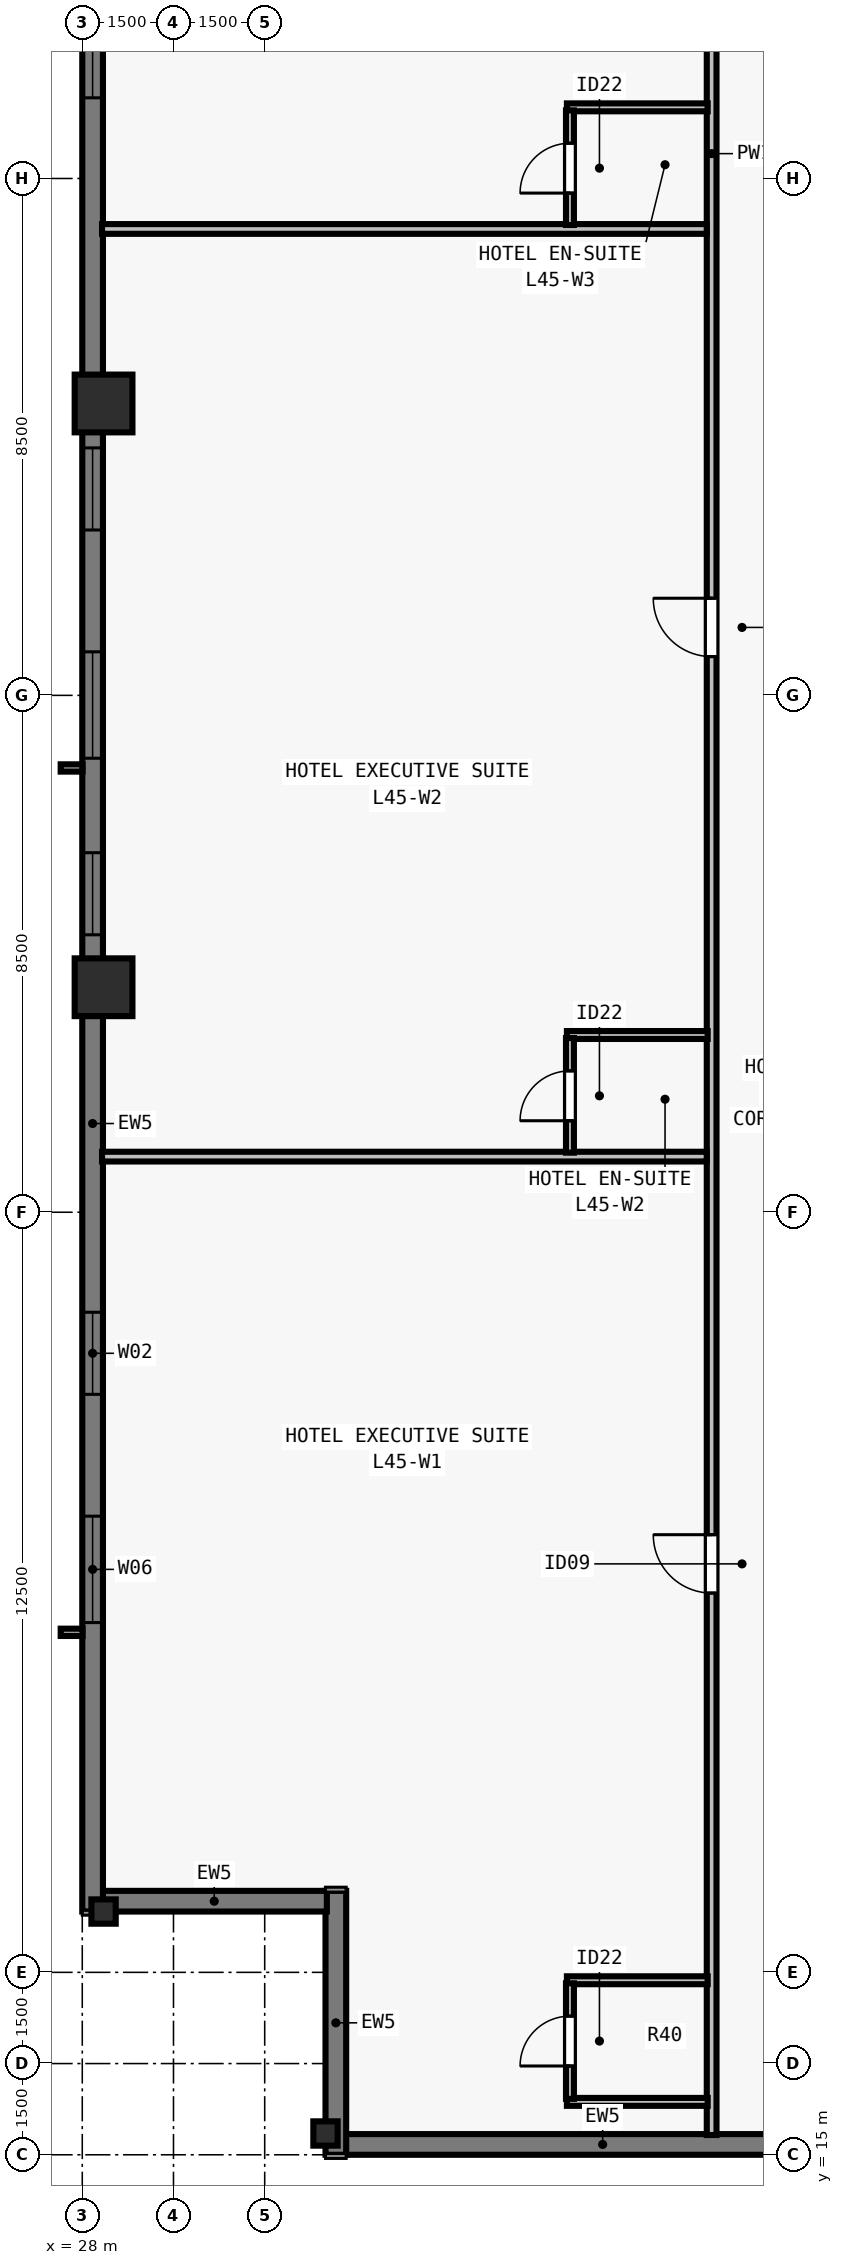
"""IFC4 building model, lengths in metres.
Left out: names, types, materials, properties, quantities, classifications, styles, units other than length and angle.
Written with IfcOpenShell. Run it as: python <this file> out.ifc"""

import sys

from ifc_helpers import new_model, si_unit, direction, frame, frame_2d, origin, origin_2d, place, context, subcontext, project, spatial, rectangle, i_section, extrude, element, fill, save


model = new_model("IFC4")
c1 = context("Model", 3, precision=1e-05, world=origin(), true_north=direction((0.0, 1.0)))
c2 = subcontext(c1, "Body", "Model", "MODEL_VIEW")
j1 = project(units=[si_unit("LENGTHUNIT", "METRE"), si_unit("PLANEANGLEUNIT", "RADIAN")], contexts=[c1])
p1 = place(None, origin())
s1 = spatial("IfcSite", under=j1, at=p1, CompositionType="ELEMENT")
p2 = place(p1, origin())
s2 = spatial("IfcBuilding", under=s1, at=p2, CompositionType="ELEMENT")
p3 = place(p2, frame((0.0, 0.0, 165.5)))
s3 = spatial("IfcBuildingStorey", under=s2, at=p3, CompositionType="ELEMENT", Elevation=165.5)
p4 = place(p3, frame((32.0, 15.35, 0.0), z_axis=(0.0, 0.0, 1.0), x_axis=(1.0, 0.0, 0.0)))
e1 = element("IfcColumn", 1, at=p4, inside=s3, PredefinedType="COLUMN", context=c2, shape_type="SweptSolid", body=[
    extrude(i_section(OverallWidth=0.4, OverallDepth=0.4, WebThickness=0.022, FlangeThickness=0.036, at=origin_2d()), origin(), (0.0, 0.0, 1.0), 3.5),
])
for number, where, z_axis, x_axis in (
    (2, (28.35, 43.8, 0.0), (0.0, 0.0, 1.0), (0.0, 1.0, 0.0)),
    (3, (28.35, 34.2, 0.0), (0.0, 0.0, 1.0), (0.0, 1.0, 0.0)),
):
    element("IfcColumn", number, at=place(p3, frame(where, z_axis=z_axis, x_axis=x_axis)), inside=s3, PredefinedType="COLUMN", context=c2, shape_type="SweptSolid", body=[
        extrude(rectangle(XDim=0.95, YDim=0.95, at=origin_2d()), origin(), (0.0, 0.0, 1.0), 3.5),
    ])
p5 = place(p3, frame((28.35, 19.0, 0.0), z_axis=(0.0, 0.0, 1.0), x_axis=(0.0, 1.0, 0.0)))
e4 = element("IfcColumn", 4, at=p5, inside=s3, PredefinedType="COLUMN", context=c2, shape_type="SweptSolid", body=[
    extrude(i_section(OverallWidth=0.4, OverallDepth=0.4, WebThickness=0.022, FlangeThickness=0.036, at=origin_2d()), origin(), (0.0, 0.0, 1.0), 3.5),
])
p6 = place(p3, frame((58.2, 15.17, 0.0), z_axis=(0.0, 0.0, 1.0), x_axis=(-1.0, 0.0, 0.0)))
e5 = element("IfcWall", 5, at=p6, inside=s3, PredefinedType="SOLIDWALL", context=c2, shape_type="SweptSolid", body=[
    extrude(rectangle(XDim=25.882, YDim=0.34, at=frame_2d((12.941, 0.0))), origin(), (0.0, 0.0, 1.0), 3.28),
])
p7 = place(p6, frame((4.793, 0.0, 0.8)))
e6 = element("IfcOpeningElement", 6, at=p7, cuts=e5, PredefinedType="OPENING", context=c2, shape_type="SweptSolid", body=[
    extrude(rectangle(XDim=1.75, YDim=1.66, at=frame_2d((0.875, 0.83))), frame((0.0, 0.18, 0.0), z_axis=(0.0, -1.0, 0.0), x_axis=(1.0, 0.0, 0.0)), (0.0, 0.0, 1.0), 0.36),
])
p8 = place(p6, frame((7.38, 0.0, 0.8)))
e7 = element("IfcOpeningElement", 7, at=p8, cuts=e5, PredefinedType="OPENING", context=c2, shape_type="SweptSolid", body=[
    extrude(rectangle(XDim=1.35, YDim=1.66, at=frame_2d((0.675, 0.83))), frame((0.0, 0.18, 0.0), z_axis=(0.0, -1.0, 0.0), x_axis=(1.0, 0.0, 0.0)), (0.0, 0.0, 1.0), 0.36),
])
p9 = place(p6, frame((13.316, 0.0, 0.8)))
e8 = element("IfcOpeningElement", 8, at=p9, cuts=e5, PredefinedType="OPENING", context=c2, shape_type="SweptSolid", body=[
    extrude(rectangle(XDim=1.75, YDim=1.66, at=frame_2d((0.875, 0.83))), frame((0.0, 0.18, 0.0), z_axis=(0.0, -1.0, 0.0), x_axis=(1.0, 0.0, 0.0)), (0.0, 0.0, 1.0), 0.36),
])
p10 = place(p6, frame((15.902, 0.0, 0.8)))
e9 = element("IfcOpeningElement", 9, at=p10, cuts=e5, PredefinedType="OPENING", context=c2, shape_type="SweptSolid", body=[
    extrude(rectangle(XDim=1.35, YDim=1.66, at=frame_2d((0.675, 0.83))), frame((0.0, 0.18, 0.0), z_axis=(0.0, -1.0, 0.0), x_axis=(1.0, 0.0, 0.0)), (0.0, 0.0, 1.0), 0.36),
])
p11 = place(p6, frame((9.51, 0.0, 0.8)))
e10 = element("IfcOpeningElement", 10, at=p11, cuts=e5, PredefinedType="OPENING", context=c2, shape_type="SweptSolid", body=[
    extrude(rectangle(XDim=0.75, YDim=1.66, at=frame_2d((0.375, 0.83))), frame((0.0, 0.18, 0.0), z_axis=(0.0, -1.0, 0.0), x_axis=(1.0, 0.0, 0.0)), (0.0, 0.0, 1.0), 0.36),
])
p12 = place(p6, frame((2.07, 0.0, 0.8)))
e11 = element("IfcOpeningElement", 11, at=p12, cuts=e5, PredefinedType="OPENING", context=c2, shape_type="SweptSolid", body=[
    extrude(rectangle(XDim=0.9, YDim=1.66, at=frame_2d((0.45, 0.83))), frame((0.0, 0.18, 0.0), z_axis=(0.0, -1.0, 0.0), x_axis=(1.0, 0.0, 0.0)), (0.0, 0.0, 1.0), 0.36),
])
p13 = place(p3, frame((32.17, 15.0, 0.0), z_axis=(0.0, 0.0, 1.0), x_axis=(0.0, 1.0, 0.0)))
e12 = element("IfcWall", 12, at=p13, inside=s3, PredefinedType="SOLIDWALL", context=c2, shape_type="SweptSolid", body=[
    extrude(rectangle(XDim=4.34, YDim=0.34, at=frame_2d((2.17, 0.0))), origin(), (0.0, 0.0, 1.0), 3.28),
])
p14 = place(p3, frame((32.022, 19.17, 0.0), z_axis=(0.0, 0.0, 1.0), x_axis=(-1.0, 0.0, 0.0)))
e13 = element("IfcWall", 13, at=p14, inside=s3, PredefinedType="SOLIDWALL", context=c2, shape_type="SweptSolid", body=[
    extrude(rectangle(XDim=3.704, YDim=0.34, at=frame_2d((1.852, 0.0))), origin(), (0.0, 0.0, 1.0), 3.28),
])
p15 = place(p3, frame((28.17, 19.0, 0.0), z_axis=(0.0, 0.0, 1.0), x_axis=(0.0, 1.0, 0.0)))
e14 = element("IfcWall", 14, at=p15, inside=s3, PredefinedType="SOLIDWALL", context=c2, shape_type="SweptSolid", body=[
    extrude(rectangle(XDim=39.682, YDim=0.34, at=frame_2d((19.841, 0.0))), origin(), (0.0, 0.0, 1.0), 3.28),
])
p16 = place(p15, frame((4.752, 0.0, 0.8)))
e15 = element("IfcOpeningElement", 15, at=p16, cuts=e14, PredefinedType="OPENING", context=c2, shape_type="SweptSolid", body=[
    extrude(rectangle(XDim=1.75, YDim=1.66, at=frame_2d((0.875, 0.83))), frame((0.0, 0.18, 0.0), z_axis=(0.0, -1.0, 0.0), x_axis=(1.0, 0.0, 0.0)), (0.0, 0.0, 1.0), 0.36),
])
p17 = place(p15, frame((8.505, 0.0, 0.8)))
e16 = element("IfcOpeningElement", 16, at=p17, cuts=e14, PredefinedType="OPENING", context=c2, shape_type="SweptSolid", body=[
    extrude(rectangle(XDim=1.35, YDim=1.66, at=frame_2d((0.675, 0.83))), frame((0.0, 0.18, 0.0), z_axis=(0.0, -1.0, 0.0), x_axis=(1.0, 0.0, 0.0)), (0.0, 0.0, 1.0), 0.36),
])
p18 = place(p15, frame((16.062, 0.0, 0.8)))
e17 = element("IfcOpeningElement", 17, at=p18, cuts=e14, PredefinedType="OPENING", context=c2, shape_type="SweptSolid", body=[
    extrude(rectangle(XDim=1.35, YDim=1.66, at=frame_2d((0.675, 0.83))), frame((0.0, 0.18, 0.0), z_axis=(0.0, -1.0, 0.0), x_axis=(1.0, 0.0, 0.0)), (0.0, 0.0, 1.0), 0.36),
])
p19 = place(p15, frame((18.966, 0.0, 0.8)))
e18 = element("IfcOpeningElement", 18, at=p19, cuts=e14, PredefinedType="OPENING", context=c2, shape_type="SweptSolid", body=[
    extrude(rectangle(XDim=1.75, YDim=1.66, at=frame_2d((0.875, 0.83))), frame((0.0, 0.18, 0.0), z_axis=(0.0, -1.0, 0.0), x_axis=(1.0, 0.0, 0.0)), (0.0, 0.0, 1.0), 0.36),
])
p20 = place(p15, frame((22.719, 0.0, 0.8)))
e19 = element("IfcOpeningElement", 19, at=p20, cuts=e14, PredefinedType="OPENING", context=c2, shape_type="SweptSolid", body=[
    extrude(rectangle(XDim=1.35, YDim=1.66, at=frame_2d((0.675, 0.83))), frame((0.0, 0.18, 0.0), z_axis=(0.0, -1.0, 0.0), x_axis=(1.0, 0.0, 0.0)), (0.0, 0.0, 1.0), 0.36),
])
p21 = place(p15, frame((29.827, 0.0, 0.8)))
e20 = element("IfcOpeningElement", 20, at=p21, cuts=e14, PredefinedType="OPENING", context=c2, shape_type="SweptSolid", body=[
    extrude(rectangle(XDim=1.35, YDim=1.66, at=frame_2d((0.675, 0.83))), frame((0.0, 0.18, 0.0), z_axis=(0.0, -1.0, 0.0), x_axis=(1.0, 0.0, 0.0)), (0.0, 0.0, 1.0), 0.36),
])
p22 = place(p15, frame((33.18, 0.0, 0.8)))
e21 = element("IfcOpeningElement", 21, at=p22, cuts=e14, PredefinedType="OPENING", context=c2, shape_type="SweptSolid", body=[
    extrude(rectangle(XDim=1.75, YDim=1.66, at=frame_2d((0.875, 0.83))), frame((0.0, 0.18, 0.0), z_axis=(0.0, -1.0, 0.0), x_axis=(1.0, 0.0, 0.0)), (0.0, 0.0, 1.0), 0.36),
])
p23 = place(p3, frame((38.35, 15.325, 0.0), z_axis=(0.0, 0.0, 1.0), x_axis=(0.0, 1.0, 0.0)))
e22 = element("IfcWall", 22, at=p23, inside=s3, PredefinedType="PARTITIONING", context=c2, shape_type="SweptSolid", body=[
    extrude(rectangle(XDim=47.35, YDim=0.16, at=frame_2d((23.675, 0.0))), origin(), (0.0, 0.0, 1.0), 2.555),
])
p24 = place(p23, frame((8.912, 0.0, 0.0)))
e23 = element("IfcOpeningElement", 23, at=p24, cuts=e22, PredefinedType="OPENING", context=c2, shape_type="SweptSolid", body=[
    extrude(rectangle(XDim=0.96, YDim=2.15, at=frame_2d((0.48, 1.075))), frame((0.0, 0.09, 0.0), z_axis=(0.0, -1.0, 0.0), x_axis=(1.0, 0.0, 0.0)), (0.0, 0.0, 1.0), 0.18),
])
p25 = place(p23, frame((24.312, 0.0, 0.0)))
e24 = element("IfcOpeningElement", 24, at=p25, cuts=e22, PredefinedType="OPENING", context=c2, shape_type="SweptSolid", body=[
    extrude(rectangle(XDim=0.96, YDim=2.15, at=frame_2d((0.48, 1.075))), frame((0.0, 0.09, 0.0), z_axis=(0.0, -1.0, 0.0), x_axis=(1.0, 0.0, 0.0)), (0.0, 0.0, 1.0), 0.18),
])
p26 = place(p23, frame((39.895, 0.0, 0.0)))
e25 = element("IfcOpeningElement", 25, at=p26, cuts=e22, PredefinedType="OPENING", context=c2, shape_type="SweptSolid", body=[
    extrude(rectangle(XDim=0.96, YDim=2.15, at=frame_2d((0.48, 1.075))), frame((0.0, 0.09, 0.0), z_axis=(0.0, -1.0, 0.0), x_axis=(1.0, 0.0, 0.0)), (0.0, 0.0, 1.0), 0.18),
])
for number, where, z_axis, x_axis in (
    (26, (35.97, 15.87, 0.0), (0.0, 0.0, 1.0), (1.0, 0.0, 0.0)),
    (27, (35.97, 17.87, 0.0), (0.0, 0.0, 1.0), (1.0, 0.0, 0.0)),
):
    element("IfcWall", number, at=place(p3, frame(where, z_axis=z_axis, x_axis=x_axis)), inside=s3, PredefinedType="PLUMBINGWALL", context=c2, shape_type="SweptSolid", body=[
        extrude(rectangle(XDim=2.315, YDim=0.13, at=frame_2d((1.157, 0.0))), origin(), (0.0, 0.0, 1.0), 3.28),
    ])
p27 = place(p3, frame((36.02, 15.92, 0.0), z_axis=(0.0, 0.0, 1.0), x_axis=(0.0, 1.0, 0.0)))
e28 = element("IfcWall", 28, at=p27, inside=s3, PredefinedType="PLUMBINGWALL", context=c2, shape_type="SweptSolid", body=[
    extrude(rectangle(XDim=1.9, YDim=0.13, at=frame_2d((0.95, 0.0))), origin(), (0.0, 0.0, 1.0), 3.28),
])
p28 = place(p27, frame((0.54, 0.0, 0.0)))
e29 = element("IfcOpeningElement", 29, at=p28, cuts=e28, PredefinedType="OPENING", context=c2, shape_type="SweptSolid", body=[
    extrude(rectangle(XDim=0.82, YDim=2.1, at=frame_2d((0.41, 1.05))), frame((0.0, 0.075, 0.0), z_axis=(0.0, -1.0, 0.0), x_axis=(1.0, 0.0, 0.0)), (0.0, 0.0, 1.0), 0.15),
])
p29 = place(p3, frame((28.325, 31.415, 0.0), z_axis=(0.0, 0.0, 1.0), x_axis=(1.0, 0.0, 0.0)))
e30 = element("IfcWall", 30, at=p29, inside=s3, PredefinedType="PARTITIONING", context=c2, shape_type="SweptSolid", body=[
    extrude(rectangle(XDim=9.945, YDim=0.16, at=frame_2d((4.973, 0.0))), origin(), (0.0, 0.0, 1.0), 3.28),
])
p30 = place(p3, frame((35.97, 33.415, 0.0), z_axis=(0.0, 0.0, 1.0), x_axis=(1.0, 0.0, 0.0)))
e31 = element("IfcWall", 31, at=p30, inside=s3, PredefinedType="PLUMBINGWALL", context=c2, shape_type="SweptSolid", body=[
    extrude(rectangle(XDim=2.315, YDim=0.13, at=frame_2d((1.157, 0.0))), origin(), (0.0, 0.0, 1.0), 3.28),
])
p31 = place(p3, frame((36.02, 31.479, 0.0), z_axis=(0.0, 0.0, 1.0), x_axis=(0.0, 1.0, 0.0)))
e32 = element("IfcWall", 32, at=p31, inside=s3, PredefinedType="PLUMBINGWALL", context=c2, shape_type="SweptSolid", body=[
    extrude(rectangle(XDim=1.885, YDim=0.13, at=frame_2d((0.942, 0.0))), origin(), (0.0, 0.0, 1.0), 3.28),
])
p32 = place(p31, frame((0.525, 0.0, 0.0)))
e33 = element("IfcOpeningElement", 33, at=p32, cuts=e32, PredefinedType="OPENING", context=c2, shape_type="SweptSolid", body=[
    extrude(rectangle(XDim=0.82, YDim=2.1, at=frame_2d((0.41, 1.05))), frame((0.0, 0.075, 0.0), z_axis=(0.0, -1.0, 0.0), x_axis=(1.0, 0.0, 0.0)), (0.0, 0.0, 1.0), 0.15),
])
p33 = place(p3, frame((28.325, 46.67, 0.0), z_axis=(0.0, 0.0, 1.0), x_axis=(1.0, 0.0, 0.0)))
e34 = element("IfcWall", 34, at=p33, inside=s3, PredefinedType="PARTITIONING", context=c2, shape_type="SweptSolid", body=[
    extrude(rectangle(XDim=9.945, YDim=0.16, at=frame_2d((4.973, 0.0))), origin(), (0.0, 0.0, 1.0), 3.28),
])
p34 = place(p3, frame((35.97, 48.67, 0.0), z_axis=(0.0, 0.0, 1.0), x_axis=(1.0, 0.0, 0.0)))
e35 = element("IfcWall", 35, at=p34, inside=s3, PredefinedType="PLUMBINGWALL", context=c2, shape_type="SweptSolid", body=[
    extrude(rectangle(XDim=2.315, YDim=0.13, at=frame_2d((1.157, 0.0))), origin(), (0.0, 0.0, 1.0), 3.28),
])
p35 = place(p3, frame((36.02, 46.735, 0.0), z_axis=(0.0, 0.0, 1.0), x_axis=(0.0, 1.0, 0.0)))
e36 = element("IfcWall", 36, at=p35, inside=s3, PredefinedType="PLUMBINGWALL", context=c2, shape_type="SweptSolid", body=[
    extrude(rectangle(XDim=1.885, YDim=0.13, at=frame_2d((0.942, 0.0))), origin(), (0.0, 0.0, 1.0), 3.28),
])
p36 = place(p35, frame((0.525, 0.0, 0.0)))
e37 = element("IfcOpeningElement", 37, at=p36, cuts=e36, PredefinedType="OPENING", context=c2, shape_type="SweptSolid", body=[
    extrude(rectangle(XDim=0.82, YDim=2.1, at=frame_2d((0.41, 1.05))), frame((0.0, 0.075, 0.0), z_axis=(0.0, -1.0, 0.0), x_axis=(1.0, 0.0, 0.0)), (0.0, 0.0, 1.0), 0.15),
])
p37 = place(p16, origin())
e38 = element("IfcWindow", 38, at=p37, inside=s3, PartitioningType="SINGLE_PANEL", PredefinedType="WINDOW", context=c2, shape_type="SweptSolid", body=[
    extrude(rectangle(XDim=1.75, YDim=1.66, at=frame_2d((0.875, 0.83))), frame((0.0, -0.05, 0.0), z_axis=(0.0, -1.0, 0.0), x_axis=(1.0, 0.0, 0.0)), (0.0, 0.0, 1.0), 0.06),
])
fill(e15, e38)
p38 = place(p17, origin())
e39 = element("IfcWindow", 39, at=p38, inside=s3, PartitioningType="SINGLE_PANEL", PredefinedType="WINDOW", context=c2, shape_type="SweptSolid", body=[
    extrude(rectangle(XDim=1.35, YDim=1.66, at=frame_2d((0.675, 0.83))), frame((0.0, -0.05, 0.0), z_axis=(0.0, -1.0, 0.0), x_axis=(1.0, 0.0, 0.0)), (0.0, 0.0, 1.0), 0.06),
])
fill(e16, e39)
p39 = place(p18, origin())
e40 = element("IfcWindow", 40, at=p39, inside=s3, PartitioningType="SINGLE_PANEL", PredefinedType="WINDOW", context=c2, shape_type="SweptSolid", body=[
    extrude(rectangle(XDim=1.35, YDim=1.66, at=frame_2d((0.675, 0.83))), frame((0.0, -0.05, 0.0), z_axis=(0.0, -1.0, 0.0), x_axis=(1.0, 0.0, 0.0)), (0.0, 0.0, 1.0), 0.06),
])
fill(e17, e40)
p40 = place(p19, origin())
e41 = element("IfcWindow", 41, at=p40, inside=s3, PartitioningType="SINGLE_PANEL", PredefinedType="WINDOW", context=c2, shape_type="SweptSolid", body=[
    extrude(rectangle(XDim=1.75, YDim=1.66, at=frame_2d((0.875, 0.83))), frame((0.0, -0.05, 0.0), z_axis=(0.0, -1.0, 0.0), x_axis=(1.0, 0.0, 0.0)), (0.0, 0.0, 1.0), 0.06),
])
fill(e18, e41)
p41 = place(p20, origin())
e42 = element("IfcWindow", 42, at=p41, inside=s3, PartitioningType="SINGLE_PANEL", PredefinedType="WINDOW", context=c2, shape_type="SweptSolid", body=[
    extrude(rectangle(XDim=1.35, YDim=1.66, at=frame_2d((0.675, 0.83))), frame((0.0, -0.05, 0.0), z_axis=(0.0, -1.0, 0.0), x_axis=(1.0, 0.0, 0.0)), (0.0, 0.0, 1.0), 0.06),
])
fill(e19, e42)
p42 = place(p21, origin())
e43 = element("IfcWindow", 43, at=p42, inside=s3, PartitioningType="SINGLE_PANEL", PredefinedType="WINDOW", context=c2, shape_type="SweptSolid", body=[
    extrude(rectangle(XDim=1.35, YDim=1.66, at=frame_2d((0.675, 0.83))), frame((0.0, -0.05, 0.0), z_axis=(0.0, -1.0, 0.0), x_axis=(1.0, 0.0, 0.0)), (0.0, 0.0, 1.0), 0.06),
])
fill(e20, e43)
p43 = place(p28, origin())
e44 = element("IfcDoor", 44, at=p43, inside=s3, OperationType="SINGLE_SWING_LEFT", PredefinedType="DOOR", context=c2, shape_type="SweptSolid", body=[
    extrude(rectangle(XDim=0.82, YDim=2.1, at=frame_2d((0.41, 1.05))), frame((0.0, 0.025, 0.0), z_axis=(0.0, -1.0, 0.0), x_axis=(1.0, 0.0, 0.0)), (0.0, 0.0, 1.0), 0.05),
])
fill(e29, e44)
p44 = place(p24, origin())
e45 = element("IfcDoor", 45, at=p44, inside=s3, OperationType="SINGLE_SWING_RIGHT", PredefinedType="DOOR", context=c2, shape_type="SweptSolid", body=[
    extrude(rectangle(XDim=0.96, YDim=2.15, at=frame_2d((0.48, 1.075))), frame((0.0, 0.025, 0.0), z_axis=(0.0, -1.0, 0.0), x_axis=(1.0, 0.0, 0.0)), (0.0, 0.0, 1.0), 0.05),
])
fill(e23, e45)
p45 = place(p32, origin())
e46 = element("IfcDoor", 46, at=p45, inside=s3, OperationType="SINGLE_SWING_LEFT", PredefinedType="DOOR", context=c2, shape_type="SweptSolid", body=[
    extrude(rectangle(XDim=0.82, YDim=2.1, at=frame_2d((0.41, 1.05))), frame((0.0, 0.025, 0.0), z_axis=(0.0, -1.0, 0.0), x_axis=(1.0, 0.0, 0.0)), (0.0, 0.0, 1.0), 0.05),
])
fill(e33, e46)
p46 = place(p25, origin())
e47 = element("IfcDoor", 47, at=p46, inside=s3, OperationType="SINGLE_SWING_RIGHT", PredefinedType="DOOR", context=c2, shape_type="SweptSolid", body=[
    extrude(rectangle(XDim=0.96, YDim=2.15, at=frame_2d((0.48, 1.075))), frame((0.0, 0.025, 0.0), z_axis=(0.0, -1.0, 0.0), x_axis=(1.0, 0.0, 0.0)), (0.0, 0.0, 1.0), 0.05),
])
fill(e24, e47)
p47 = place(p36, origin())
e48 = element("IfcDoor", 48, at=p47, inside=s3, OperationType="SINGLE_SWING_LEFT", PredefinedType="DOOR", context=c2, shape_type="SweptSolid", body=[
    extrude(rectangle(XDim=0.82, YDim=2.1, at=frame_2d((0.41, 1.05))), frame((0.0, 0.025, 0.0), z_axis=(0.0, -1.0, 0.0), x_axis=(1.0, 0.0, 0.0)), (0.0, 0.0, 1.0), 0.05),
])
fill(e37, e48)
save(model, sys.argv[1])
